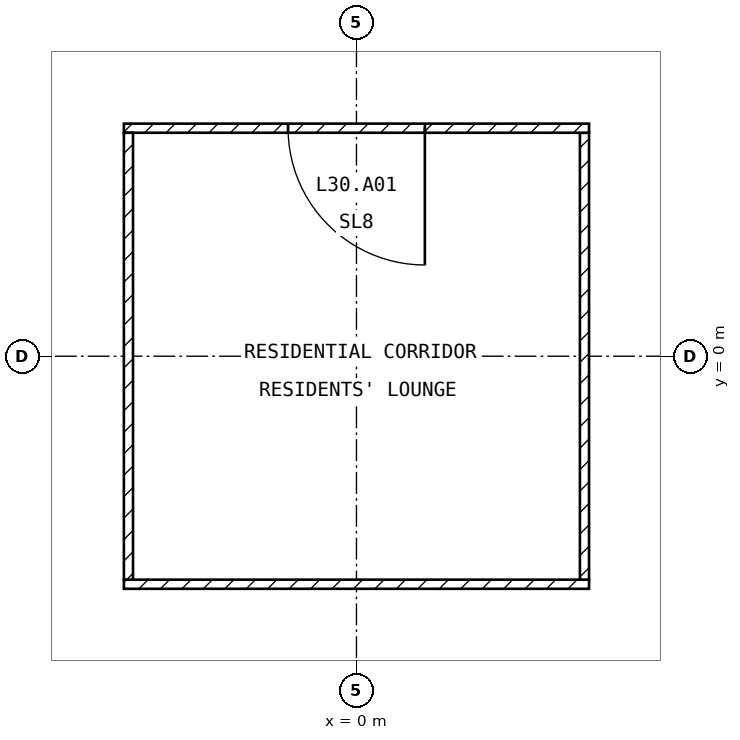
"""IFC4 building model, lengths in metres.
Left out: names, types, materials, properties, quantities, classifications, styles, units other than length and angle.
Written with IfcOpenShell. Run it as: python <this file> out.ifc"""

import sys

from ifc_helpers import new_model, si_unit, direction, frame, frame_2d, origin, place, context, subcontext, project, spatial, rectangle, extrude, element, fill, save


model = new_model("IFC4")
c1 = context("Model", 3, precision=1e-05, world=origin(), true_north=direction((0.0, 1.0)))
c2 = subcontext(c1, "Body", "Model", "MODEL_VIEW")
j1 = project(units=[si_unit("LENGTHUNIT", "METRE"), si_unit("PLANEANGLEUNIT", "RADIAN")], contexts=[c1])
p1 = place(None, origin())
s1 = spatial("IfcSite", under=j1, at=p1, CompositionType="ELEMENT")
p2 = place(p1, origin())
s2 = spatial("IfcBuilding", under=s1, at=p2, CompositionType="ELEMENT")
p3 = place(p2, frame((0.0, 0.0, 126.9)))
s3 = spatial("IfcBuildingStorey", under=s2, at=p3, CompositionType="ELEMENT", Elevation=126.9)
p4 = place(p3, frame((-3.06, -3.0, 0.0), z_axis=(0.0, 0.0, 1.0), x_axis=(1.0, 0.0, 0.0)))
e1 = element("IfcWall", 1, at=p4, inside=s3, PredefinedType="PARTITIONING", context=c2, shape_type="SweptSolid", body=[
    extrude(rectangle(XDim=6.12, YDim=0.12, at=frame_2d((3.06, 0.0))), origin(), (0.0, 0.0, 1.0), 3.25),
])
p5 = place(p3, frame((3.0, -2.94, 0.0), z_axis=(0.0, 0.0, 1.0), x_axis=(0.0, 1.0, 0.0)))
e2 = element("IfcWall", 2, at=p5, inside=s3, PredefinedType="PARTITIONING", context=c2, shape_type="SweptSolid", body=[
    extrude(rectangle(XDim=5.88, YDim=0.12, at=frame_2d((2.94, 0.0))), origin(), (0.0, 0.0, 1.0), 3.25),
])
p6 = place(p3, frame((3.06, 3.0, 0.0), z_axis=(0.0, 0.0, 1.0), x_axis=(-1.0, 0.0, 0.0)))
e3 = element("IfcWall", 3, at=p6, inside=s3, PredefinedType="PARTITIONING", context=c2, shape_type="SweptSolid", body=[
    extrude(rectangle(XDim=6.12, YDim=0.12, at=frame_2d((3.06, 0.0))), origin(), (0.0, 0.0, 1.0), 3.25),
])
p7 = place(p6, frame((2.16, 0.0, 0.0)))
e4 = element("IfcOpeningElement", 4, at=p7, cuts=e3, PredefinedType="OPENING", context=c2, shape_type="SweptSolid", body=[
    extrude(rectangle(XDim=1.8, YDim=2.1, at=frame_2d((0.9, 1.05))), frame((0.0, 0.07, 0.0), z_axis=(0.0, -1.0, 0.0), x_axis=(1.0, 0.0, 0.0)), (0.0, 0.0, 1.0), 0.14),
])
p8 = place(p3, frame((-3.0, 2.94, 0.0), z_axis=(0.0, 0.0, 1.0), x_axis=(0.0, -1.0, 0.0)))
e5 = element("IfcWall", 5, at=p8, inside=s3, PredefinedType="PARTITIONING", context=c2, shape_type="SweptSolid", body=[
    extrude(rectangle(XDim=5.88, YDim=0.12, at=frame_2d((2.94, 0.0))), origin(), (0.0, 0.0, 1.0), 3.25),
])
p9 = place(p7, origin())
e6 = element("IfcDoor", 6, at=p9, inside=s3, OperationType="SINGLE_SWING_LEFT", PredefinedType="DOOR", context=c2, shape_type="SweptSolid", body=[
    extrude(rectangle(XDim=1.8, YDim=2.1, at=frame_2d((0.9, 1.05))), frame((0.0, 0.025, 0.0), z_axis=(0.0, -1.0, 0.0), x_axis=(1.0, 0.0, 0.0)), (0.0, 0.0, 1.0), 0.05),
])
fill(e4, e6)
save(model, sys.argv[1])
